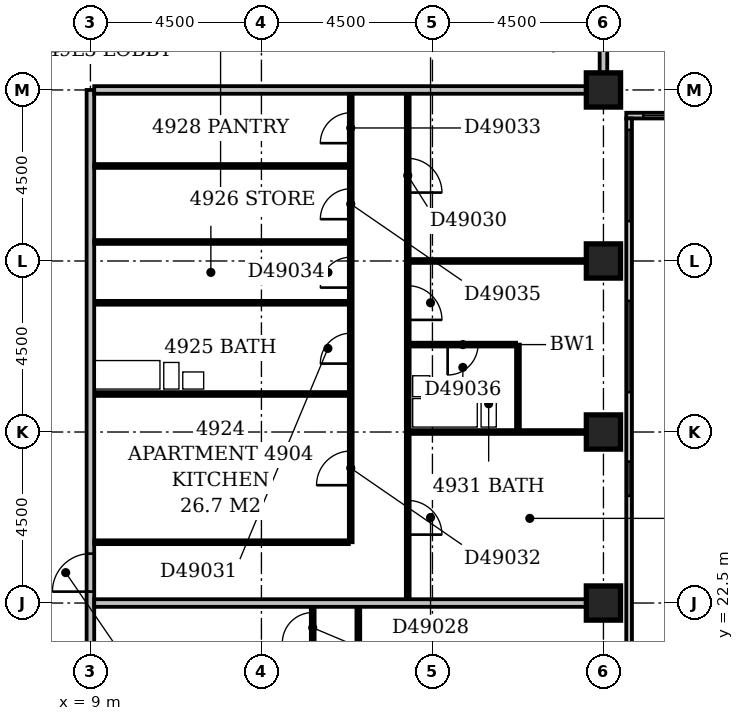
"""IFC4 building model, lengths in metres.
Left out: names, types, materials, properties, quantities, classifications, styles, units other than length and angle.
Written with IfcOpenShell. Run it as: python <this file> out.ifc"""

import sys

from ifc_helpers import new_model, si_unit, direction, frame, frame_2d, origin, origin_2d, place, context, subcontext, project, spatial, rectangle, extrude, element, fill, save


model = new_model("IFC4")
c1 = context("Model", 3, precision=1e-05, world=origin(), true_north=direction((0.0, 1.0)))
c2 = subcontext(c1, "Body", "Model", "MODEL_VIEW")
j1 = project(units=[si_unit("LENGTHUNIT", "METRE"), si_unit("PLANEANGLEUNIT", "RADIAN")], contexts=[c1])
p1 = place(None, origin())
s1 = spatial("IfcSite", under=j1, at=p1, CompositionType="ELEMENT")
p2 = place(p1, origin())
s2 = spatial("IfcBuilding", under=s1, at=p2, CompositionType="ELEMENT")
p3 = place(p2, frame((0.0, 0.0, 193.4)))
s3 = spatial("IfcBuildingStorey", under=s2, at=p3, CompositionType="ELEMENT", Elevation=193.4)
for number, where, z_axis, x_axis in (
    (1, (22.5, 22.5, -0.3), (0.0, 0.0, 1.0), (1.0, 0.0, 0.0)),
    (2, (22.5, 27.0, -0.3), (0.0, 0.0, 1.0), (1.0, 0.0, 0.0)),
    (3, (22.5, 31.5, -0.3), (0.0, 0.0, 1.0), (1.0, 0.0, 0.0)),
    (4, (22.5, 36.0, -0.3), (0.0, 0.0, 1.0), (1.0, 0.0, 0.0)),
):
    element("IfcColumn", number, at=place(p3, frame(where, z_axis=z_axis, x_axis=x_axis)), inside=s3, PredefinedType="COLUMN", context=c2, shape_type="SweptSolid", body=[
        extrude(rectangle(XDim=0.9, YDim=0.9, at=origin_2d()), origin(), (0.0, 0.0, 1.0), 3.6),
    ])
p4 = place(p3, frame((23.175, 17.4, 0.0), z_axis=(0.0, 0.0, 1.0), x_axis=(0.0, 1.0, 0.0)))
e5 = element("IfcWall", 5, at=p4, inside=s3, PredefinedType="STANDARD", context=c2, shape_type="SweptSolid", body=[
    extrude(rectangle(XDim=17.85, YDim=0.15, at=frame_2d((8.925, 0.0))), origin(), (0.0, 0.0, 1.0), 2.7),
])
p5 = place(p4, frame((1.65, 0.0, 0.6)))
e6 = element("IfcOpeningElement", 6, at=p5, cuts=e5, PredefinedType="OPENING", context=c2, shape_type="SweptSolid", body=[
    extrude(rectangle(XDim=2.4, YDim=1.8, at=frame_2d((1.2, 0.9))), frame((0.0, 0.087, 0.0), z_axis=(0.0, -1.0, 0.0), x_axis=(1.0, 0.0, 0.0)), (0.0, 0.0, 1.0), 0.174),
])
p6 = place(p4, frame((7.922, 0.0, 0.6)))
e7 = element("IfcOpeningElement", 7, at=p6, cuts=e5, PredefinedType="OPENING", context=c2, shape_type="SweptSolid", body=[
    extrude(rectangle(XDim=0.9, YDim=1.8, at=frame_2d((0.45, 0.9))), frame((0.0, 0.087, 0.0), z_axis=(0.0, -1.0, 0.0), x_axis=(1.0, 0.0, 0.0)), (0.0, 0.0, 1.0), 0.174),
])
p7 = place(p4, frame((10.65, 0.0, 0.6)))
e8 = element("IfcOpeningElement", 8, at=p7, cuts=e5, PredefinedType="OPENING", context=c2, shape_type="SweptSolid", body=[
    extrude(rectangle(XDim=2.4, YDim=1.8, at=frame_2d((1.2, 0.9))), frame((0.0, 0.087, 0.0), z_axis=(0.0, -1.0, 0.0), x_axis=(1.0, 0.0, 0.0)), (0.0, 0.0, 1.0), 0.174),
])
p8 = place(p4, frame((15.15, 0.0, 0.6)))
e9 = element("IfcOpeningElement", 9, at=p8, cuts=e5, PredefinedType="OPENING", context=c2, shape_type="SweptSolid", body=[
    extrude(rectangle(XDim=2.4, YDim=1.8, at=frame_2d((1.2, 0.9))), frame((0.0, 0.087, 0.0), z_axis=(0.0, -1.0, 0.0), x_axis=(1.0, 0.0, 0.0)), (0.0, 0.0, 1.0), 0.174),
])
p9 = place(p3, frame((23.1, 35.325, 0.0), z_axis=(0.0, 0.0, 1.0), x_axis=(1.0, 0.0, 0.0)))
e10 = element("IfcWall", 10, at=p9, inside=s3, PredefinedType="STANDARD", context=c2, shape_type="SweptSolid", body=[
    extrude(rectangle(XDim=27.15, YDim=0.15, at=frame_2d((13.575, 0.0))), origin(), (0.0, 0.0, 1.0), 2.7),
])
p10 = place(p9, frame((0.45, 0.0, 0.6)))
e11 = element("IfcOpeningElement", 11, at=p10, cuts=e10, PredefinedType="OPENING", context=c2, shape_type="SweptSolid", body=[
    extrude(rectangle(XDim=2.4, YDim=1.8, at=frame_2d((1.2, 0.9))), frame((0.0, 0.087, 0.0), z_axis=(0.0, -1.0, 0.0), x_axis=(1.0, 0.0, 0.0)), (0.0, 0.0, 1.0), 0.174),
])
p11 = place(p9, frame((5.831, 0.0, 0.6)))
e12 = element("IfcOpeningElement", 12, at=p11, cuts=e10, PredefinedType="OPENING", context=c2, shape_type="SweptSolid", body=[
    extrude(rectangle(XDim=1.8, YDim=1.8, at=frame_2d((0.9, 0.9))), frame((0.0, 0.087, 0.0), z_axis=(0.0, -1.0, 0.0), x_axis=(1.0, 0.0, 0.0)), (0.0, 0.0, 1.0), 0.174),
])
p12 = place(p9, frame((9.45, 0.0, 0.6)))
e13 = element("IfcOpeningElement", 13, at=p12, cuts=e10, PredefinedType="OPENING", context=c2, shape_type="SweptSolid", body=[
    extrude(rectangle(XDim=2.4, YDim=1.8, at=frame_2d((1.2, 0.9))), frame((0.0, 0.087, 0.0), z_axis=(0.0, -1.0, 0.0), x_axis=(1.0, 0.0, 0.0)), (0.0, 0.0, 1.0), 0.174),
])
p13 = place(p9, frame((13.95, 0.0, 0.6)))
e14 = element("IfcOpeningElement", 14, at=p13, cuts=e10, PredefinedType="OPENING", context=c2, shape_type="SweptSolid", body=[
    extrude(rectangle(XDim=2.4, YDim=1.8, at=frame_2d((1.2, 0.9))), frame((0.0, 0.087, 0.0), z_axis=(0.0, -1.0, 0.0), x_axis=(1.0, 0.0, 0.0)), (0.0, 0.0, 1.0), 0.174),
])
p14 = place(p9, frame((18.153, 0.0, 0.6)))
e15 = element("IfcOpeningElement", 15, at=p14, cuts=e10, PredefinedType="OPENING", context=c2, shape_type="SweptSolid", body=[
    extrude(rectangle(XDim=2.4, YDim=1.8, at=frame_2d((1.2, 0.9))), frame((0.0, 0.087, 0.0), z_axis=(0.0, -1.0, 0.0), x_axis=(1.0, 0.0, 0.0)), (0.0, 0.0, 1.0), 0.174),
])
p15 = place(p9, frame((22.95, 0.0, 0.6)))
e16 = element("IfcOpeningElement", 16, at=p15, cuts=e10, PredefinedType="OPENING", context=c2, shape_type="SweptSolid", body=[
    extrude(rectangle(XDim=2.4, YDim=1.8, at=frame_2d((1.2, 0.9))), frame((0.0, 0.087, 0.0), z_axis=(0.0, -1.0, 0.0), x_axis=(1.0, 0.0, 0.0)), (0.0, 0.0, 1.0), 0.174),
])
p16 = place(p3, frame((9.0, 5.0, 0.0), z_axis=(0.0, 0.0, 1.0), x_axis=(0.0, 1.0, 0.0)))
e17 = element("IfcWall", 17, at=p16, inside=s3, PredefinedType="PARTITIONING", context=c2, shape_type="SweptSolid", body=[
    extrude(rectangle(XDim=31.0, YDim=0.2, at=frame_2d((15.5, 0.0))), origin(), (0.0, 0.0, 1.0), 3.3),
])
p17 = place(p16, frame((17.8, 0.0, 0.0)))
e18 = element("IfcOpeningElement", 18, at=p17, cuts=e17, PredefinedType="OPENING", context=c2, shape_type="SweptSolid", body=[
    extrude(rectangle(XDim=1.0, YDim=2.1, at=frame_2d((0.5, 1.05))), frame((0.0, 0.112, 0.0), z_axis=(0.0, -1.0, 0.0), x_axis=(1.0, 0.0, 0.0)), (0.0, 0.0, 1.0), 0.224),
])
p18 = place(p16, frame((14.95, 0.0, 0.0)))
e19 = element("IfcOpeningElement", 19, at=p18, cuts=e17, PredefinedType="OPENING", context=c2, shape_type="SweptSolid", body=[
    extrude(rectangle(XDim=1.0, YDim=2.1, at=frame_2d((0.5, 1.05))), frame((0.0, 0.112, 0.0), z_axis=(0.0, -1.0, 0.0), x_axis=(1.0, 0.0, 0.0)), (0.0, 0.0, 1.0), 0.224),
])
p19 = place(p16, frame((9.3, 0.0, 0.0)))
e20 = element("IfcOpeningElement", 20, at=p19, cuts=e17, PredefinedType="OPENING", context=c2, shape_type="SweptSolid", body=[
    extrude(rectangle(XDim=1.0, YDim=2.1, at=frame_2d((0.5, 1.05))), frame((0.0, 0.112, 0.0), z_axis=(0.0, -1.0, 0.0), x_axis=(1.0, 0.0, 0.0)), (0.0, 0.0, 1.0), 0.224),
])
p20 = place(p16, frame((1.5, 0.0, 0.0)))
e21 = element("IfcOpeningElement", 21, at=p20, cuts=e17, PredefinedType="OPENING", context=c2, shape_type="SweptSolid", body=[
    extrude(rectangle(XDim=0.9, YDim=2.1, at=frame_2d((0.45, 1.05))), frame((0.0, 0.112, 0.0), z_axis=(0.0, -1.0, 0.0), x_axis=(1.0, 0.0, 0.0)), (0.0, 0.0, 1.0), 0.224),
])
p21 = place(p3, frame((16.05, 18.1, 0.0), z_axis=(0.0, 0.0, 1.0), x_axis=(0.0, 1.0, 0.0)))
e22 = element("IfcWall", 22, at=p21, inside=s3, PredefinedType="PARTITIONING", context=c2, shape_type="SweptSolid", body=[
    extrude(rectangle(XDim=4.3, YDim=0.1, at=frame_2d((2.15, 0.0))), origin(), (0.0, 0.0, 1.0), 3.3),
])
p22 = place(p21, frame((1.7, 0.0, 0.0)))
e23 = element("IfcOpeningElement", 23, at=p22, cuts=e22, PredefinedType="OPENING", context=c2, shape_type="SweptSolid", body=[
    extrude(rectangle(XDim=0.9, YDim=2.1, at=frame_2d((0.45, 1.05))), frame((0.0, 0.062, 0.0), z_axis=(0.0, -1.0, 0.0), x_axis=(1.0, 0.0, 0.0)), (0.0, 0.0, 1.0), 0.124),
])
p23 = place(p3, frame((14.85, 21.2, 0.0), z_axis=(0.0, 0.0, 1.0), x_axis=(0.0, 1.0, 0.0)))
e24 = element("IfcWall", 24, at=p23, inside=s3, PredefinedType="PARTITIONING", context=c2, shape_type="SweptSolid", body=[
    extrude(rectangle(XDim=1.2, YDim=0.1, at=frame_2d((0.6, 0.0))), origin(), (0.0, 0.0, 1.0), 3.3),
])
p24 = place(p23, frame((0.25, 0.0, 0.0)))
e25 = element("IfcOpeningElement", 25, at=p24, cuts=e24, PredefinedType="OPENING", context=c2, shape_type="SweptSolid", body=[
    extrude(rectangle(XDim=0.8, YDim=2.1, at=frame_2d((0.4, 1.05))), frame((0.0, 0.062, 0.0), z_axis=(0.0, -1.0, 0.0), x_axis=(1.0, 0.0, 0.0)), (0.0, 0.0, 1.0), 0.124),
])
p25 = place(p3, frame((9.1, 22.5, 0.0), z_axis=(0.0, 0.0, 1.0), x_axis=(1.0, 0.0, 0.0)))
e26 = element("IfcWall", 26, at=p25, inside=s3, PredefinedType="PARTITIONING", context=c2, shape_type="SweptSolid", body=[
    extrude(rectangle(XDim=12.95, YDim=0.2, at=frame_2d((6.475, 0.0))), origin(), (0.0, 0.0, 1.0), 3.3),
])
p26 = place(p3, frame((17.35, 22.6, 0.0), z_axis=(0.0, 0.0, 1.0), x_axis=(0.0, 1.0, 0.0)))
e27 = element("IfcWall", 27, at=p26, inside=s3, PredefinedType="PARTITIONING", context=c2, shape_type="SweptSolid", body=[
    extrude(rectangle(XDim=13.3, YDim=0.1, at=frame_2d((6.65, 0.0))), origin(), (0.0, 0.0, 1.0), 3.3),
])
p27 = place(p26, frame((1.7, 0.0, 0.0)))
e28 = element("IfcOpeningElement", 28, at=p27, cuts=e27, PredefinedType="OPENING", context=c2, shape_type="SweptSolid", body=[
    extrude(rectangle(XDim=0.9, YDim=2.1, at=frame_2d((0.45, 1.05))), frame((0.0, 0.062, 0.0), z_axis=(0.0, -1.0, 0.0), x_axis=(1.0, 0.0, 0.0)), (0.0, 0.0, 1.0), 0.124),
])
p28 = place(p26, frame((7.35, 0.0, 0.0)))
e29 = element("IfcOpeningElement", 29, at=p28, cuts=e27, PredefinedType="OPENING", context=c2, shape_type="SweptSolid", body=[
    extrude(rectangle(XDim=0.9, YDim=2.1, at=frame_2d((0.45, 1.05))), frame((0.0, 0.062, 0.0), z_axis=(0.0, -1.0, 0.0), x_axis=(1.0, 0.0, 0.0)), (0.0, 0.0, 1.0), 0.124),
])
p29 = place(p26, frame((10.7, 0.0, 0.0)))
e30 = element("IfcOpeningElement", 30, at=p29, cuts=e27, PredefinedType="OPENING", context=c2, shape_type="SweptSolid", body=[
    extrude(rectangle(XDim=0.9, YDim=2.1, at=frame_2d((0.45, 1.05))), frame((0.0, 0.062, 0.0), z_axis=(0.0, -1.0, 0.0), x_axis=(1.0, 0.0, 0.0)), (0.0, 0.0, 1.0), 0.124),
])
p30 = place(p3, frame((9.1, 24.1, 0.0), z_axis=(0.0, 0.0, 1.0), x_axis=(1.0, 0.0, 0.0)))
e31 = element("IfcWall", 31, at=p30, inside=s3, PredefinedType="PARTITIONING", context=c2, shape_type="SweptSolid", body=[
    extrude(rectangle(XDim=6.7, YDim=0.1, at=frame_2d((3.35, 0.0))), origin(), (0.0, 0.0, 1.0), 3.3),
])
p31 = place(p3, frame((15.85, 24.1, 0.0), z_axis=(0.0, 0.0, 1.0), x_axis=(0.0, 1.0, 0.0)))
e32 = element("IfcWall", 32, at=p31, inside=s3, PredefinedType="PARTITIONING", context=c2, shape_type="SweptSolid", body=[
    extrude(rectangle(XDim=11.8, YDim=0.1, at=frame_2d((5.9, 0.0))), origin(), (0.0, 0.0, 1.0), 3.3),
])
p32 = place(p31, frame((4.7, 0.0, 0.0)))
e33 = element("IfcOpeningElement", 33, at=p32, cuts=e32, PredefinedType="OPENING", context=c2, shape_type="SweptSolid", body=[
    extrude(rectangle(XDim=0.8, YDim=2.1, at=frame_2d((0.4, 1.05))), frame((0.0, 0.062, 0.0), z_axis=(0.0, -1.0, 0.0), x_axis=(1.0, 0.0, 0.0)), (0.0, 0.0, 1.0), 0.124),
])
p33 = place(p31, frame((1.5, 0.0, 0.0)))
e34 = element("IfcOpeningElement", 34, at=p33, cuts=e32, PredefinedType="OPENING", context=c2, shape_type="SweptSolid", body=[
    extrude(rectangle(XDim=0.9, YDim=2.1, at=frame_2d((0.45, 1.05))), frame((0.0, 0.062, 0.0), z_axis=(0.0, -1.0, 0.0), x_axis=(1.0, 0.0, 0.0)), (0.0, 0.0, 1.0), 0.124),
])
p34 = place(p31, frame((10.5, 0.0, 0.0)))
e35 = element("IfcOpeningElement", 35, at=p34, cuts=e32, PredefinedType="OPENING", context=c2, shape_type="SweptSolid", body=[
    extrude(rectangle(XDim=0.8, YDim=2.1, at=frame_2d((0.4, 1.05))), frame((0.0, 0.062, 0.0), z_axis=(0.0, -1.0, 0.0), x_axis=(1.0, 0.0, 0.0)), (0.0, 0.0, 1.0), 0.124),
])
p35 = place(p31, frame((6.7, 0.0, 0.0)))
e36 = element("IfcOpeningElement", 36, at=p35, cuts=e32, PredefinedType="OPENING", context=c2, shape_type="SweptSolid", body=[
    extrude(rectangle(XDim=0.8, YDim=2.1, at=frame_2d((0.4, 1.05))), frame((0.0, 0.062, 0.0), z_axis=(0.0, -1.0, 0.0), x_axis=(1.0, 0.0, 0.0)), (0.0, 0.0, 1.0), 0.124),
])
p36 = place(p31, frame((8.5, 0.0, 0.0)))
e37 = element("IfcOpeningElement", 37, at=p36, cuts=e32, PredefinedType="OPENING", context=c2, shape_type="SweptSolid", body=[
    extrude(rectangle(XDim=0.8, YDim=2.1, at=frame_2d((0.4, 1.05))), frame((0.0, 0.062, 0.0), z_axis=(0.0, -1.0, 0.0), x_axis=(1.0, 0.0, 0.0)), (0.0, 0.0, 1.0), 0.124),
])
p37 = place(p3, frame((17.4, 27.0, 0.0), z_axis=(0.0, 0.0, 1.0), x_axis=(1.0, 0.0, 0.0)))
e38 = element("IfcWall", 38, at=p37, inside=s3, PredefinedType="PARTITIONING", context=c2, shape_type="SweptSolid", body=[
    extrude(rectangle(XDim=4.65, YDim=0.1, at=frame_2d((2.325, 0.0))), origin(), (0.0, 0.0, 1.0), 2.7),
])
p38 = place(p3, frame((20.25, 27.05, 0.0), z_axis=(0.0, 0.0, 1.0), x_axis=(0.0, 1.0, 0.0)))
e39 = element("IfcWall", 39, at=p38, inside=s3, PredefinedType="PLUMBINGWALL", context=c2, shape_type="SweptSolid", body=[
    extrude(rectangle(XDim=2.25, YDim=0.1, at=frame_2d((1.125, 0.0))), origin(), (0.0, 0.0, 1.0), 3.3),
])
p39 = place(p3, frame((9.1, 28.0, 0.0), z_axis=(0.0, 0.0, 1.0), x_axis=(1.0, 0.0, 0.0)))
e40 = element("IfcWall", 40, at=p39, inside=s3, PredefinedType="PLUMBINGWALL", context=c2, shape_type="SweptSolid", body=[
    extrude(rectangle(XDim=6.7, YDim=0.1, at=frame_2d((3.35, 0.0))), origin(), (0.0, 0.0, 1.0), 3.3),
])
p40 = place(p3, frame((17.4, 29.3, 0.0), z_axis=(0.0, 0.0, 1.0), x_axis=(1.0, 0.0, 0.0)))
e41 = element("IfcWall", 41, at=p40, inside=s3, PredefinedType="PLUMBINGWALL", context=c2, shape_type="SweptSolid", body=[
    extrude(rectangle(XDim=2.8, YDim=0.1, at=frame_2d((1.4, 0.0))), origin(), (0.0, 0.0, 1.0), 3.3),
])
p41 = place(p40, frame((1.0, 0.0, 0.0)))
e42 = element("IfcOpeningElement", 42, at=p41, cuts=e41, PredefinedType="OPENING", context=c2, shape_type="SweptSolid", body=[
    extrude(rectangle(XDim=0.8, YDim=2.1, at=frame_2d((0.4, 1.05))), frame((0.0, 0.062, 0.0), z_axis=(0.0, -1.0, 0.0), x_axis=(1.0, 0.0, 0.0)), (0.0, 0.0, 1.0), 0.124),
])
p42 = place(p3, frame((9.1, 30.4, 0.0), z_axis=(0.0, 0.0, 1.0), x_axis=(1.0, 0.0, 0.0)))
e43 = element("IfcWall", 43, at=p42, inside=s3, PredefinedType="PLUMBINGWALL", context=c2, shape_type="SweptSolid", body=[
    extrude(rectangle(XDim=6.7, YDim=0.1, at=frame_2d((3.35, 0.0))), origin(), (0.0, 0.0, 1.0), 3.3),
])
p43 = place(p3, frame((17.4, 31.5, 0.0), z_axis=(0.0, 0.0, 1.0), x_axis=(1.0, 0.0, 0.0)))
e44 = element("IfcWall", 44, at=p43, inside=s3, PredefinedType="PARTITIONING", context=c2, shape_type="SweptSolid", body=[
    extrude(rectangle(XDim=4.65, YDim=0.1, at=frame_2d((2.325, 0.0))), origin(), (0.0, 0.0, 1.0), 3.3),
])
for number, where, z_axis, x_axis in (
    (45, (9.1, 32.0, 0.0), (0.0, 0.0, 1.0), (1.0, 0.0, 0.0)),
    (46, (9.1, 34.0, 0.0), (0.0, 0.0, 1.0), (1.0, 0.0, 0.0)),
):
    element("IfcWall", number, at=place(p3, frame(where, z_axis=z_axis, x_axis=x_axis)), inside=s3, PredefinedType="PARTITIONING", context=c2, shape_type="SweptSolid", body=[
        extrude(rectangle(XDim=6.7, YDim=0.1, at=frame_2d((3.35, 0.0))), origin(), (0.0, 0.0, 1.0), 3.3),
    ])
p44 = place(p3, frame((9.1, 36.0, 0.0), z_axis=(0.0, 0.0, 1.0), x_axis=(1.0, 0.0, 0.0)))
e47 = element("IfcWall", 47, at=p44, inside=s3, PredefinedType="PARTITIONING", context=c2, shape_type="SweptSolid", body=[
    extrude(rectangle(XDim=12.95, YDim=0.2, at=frame_2d((6.475, 0.0))), origin(), (0.0, 0.0, 1.0), 3.3),
])
p45 = place(p3, frame((22.5, 36.45, 0.0), z_axis=(0.0, 0.0, 1.0), x_axis=(0.0, 1.0, 0.0)))
e48 = element("IfcWall", 48, at=p45, inside=s3, PredefinedType="PARTITIONING", context=c2, shape_type="SweptSolid", body=[
    extrude(rectangle(XDim=13.05, YDim=0.2, at=frame_2d((6.525, 0.0))), origin(), (0.0, 0.0, 1.0), 3.3),
])
p46 = place(p6, origin())
e49 = element("IfcWindow", 49, at=p46, inside=s3, PartitioningType="SINGLE_PANEL", PredefinedType="WINDOW", context=c2, shape_type="SweptSolid", body=[
    extrude(rectangle(XDim=0.9, YDim=1.8, at=frame_2d((0.45, 0.9))), frame((0.0, 0.03, 0.0), z_axis=(0.0, -1.0, 0.0), x_axis=(1.0, 0.0, 0.0)), (0.0, 0.0, 1.0), 0.06),
])
fill(e7, e49)
p47 = place(p7, origin())
e50 = element("IfcWindow", 50, at=p47, inside=s3, PartitioningType="SINGLE_PANEL", PredefinedType="WINDOW", context=c2, shape_type="SweptSolid", body=[
    extrude(rectangle(XDim=2.4, YDim=1.8, at=frame_2d((1.2, 0.9))), frame((0.0, 0.03, 0.0), z_axis=(0.0, -1.0, 0.0), x_axis=(1.0, 0.0, 0.0)), (0.0, 0.0, 1.0), 0.06),
])
fill(e8, e50)
p48 = place(p8, origin())
e51 = element("IfcWindow", 51, at=p48, inside=s3, PartitioningType="SINGLE_PANEL", PredefinedType="WINDOW", context=c2, shape_type="SweptSolid", body=[
    extrude(rectangle(XDim=2.4, YDim=1.8, at=frame_2d((1.2, 0.9))), frame((0.0, 0.03, 0.0), z_axis=(0.0, -1.0, 0.0), x_axis=(1.0, 0.0, 0.0)), (0.0, 0.0, 1.0), 0.06),
])
fill(e9, e51)
p49 = place(p10, origin())
e52 = element("IfcWindow", 52, at=p49, inside=s3, PartitioningType="SINGLE_PANEL", PredefinedType="WINDOW", context=c2, shape_type="SweptSolid", body=[
    extrude(rectangle(XDim=2.4, YDim=1.8, at=frame_2d((1.2, 0.9))), frame((0.0, 0.03, 0.0), z_axis=(0.0, -1.0, 0.0), x_axis=(1.0, 0.0, 0.0)), (0.0, 0.0, 1.0), 0.06),
])
fill(e11, e52)
p50 = place(p17, origin())
e53 = element("IfcDoor", 53, at=p50, inside=s3, OperationType="SINGLE_SWING_LEFT", PredefinedType="DOOR", context=c2, shape_type="SweptSolid", body=[
    extrude(rectangle(XDim=1.0, YDim=2.1, at=frame_2d((0.5, 1.05))), frame((0.0, 0.025, 0.0), z_axis=(0.0, -1.0, 0.0), x_axis=(1.0, 0.0, 0.0)), (0.0, 0.0, 1.0), 0.05),
])
fill(e18, e53)
p51 = place(p24, origin())
e54 = element("IfcDoor", 54, at=p51, inside=s3, OperationType="SINGLE_SWING_LEFT", PredefinedType="DOOR", context=c2, shape_type="SweptSolid", body=[
    extrude(rectangle(XDim=0.8, YDim=2.1, at=frame_2d((0.4, 1.05))), frame((0.0, 0.025, 0.0), z_axis=(0.0, -1.0, 0.0), x_axis=(1.0, 0.0, 0.0)), (0.0, 0.0, 1.0), 0.05),
])
fill(e25, e54)
p52 = place(p27, frame((0.9, 0.0, 0.0), z_axis=(0.0, 0.0, 1.0), x_axis=(-1.0, 0.0, 0.0)))
e55 = element("IfcDoor", 55, at=p52, inside=s3, OperationType="SINGLE_SWING_RIGHT", PredefinedType="DOOR", context=c2, shape_type="SweptSolid", body=[
    extrude(rectangle(XDim=0.9, YDim=2.1, at=frame_2d((0.45, 1.05))), frame((0.0, 0.025, 0.0), z_axis=(0.0, -1.0, 0.0), x_axis=(1.0, 0.0, 0.0)), (0.0, 0.0, 1.0), 0.05),
])
fill(e28, e55)
p53 = place(p28, frame((0.9, 0.0, 0.0), z_axis=(0.0, 0.0, 1.0), x_axis=(-1.0, 0.0, 0.0)))
e56 = element("IfcDoor", 56, at=p53, inside=s3, OperationType="SINGLE_SWING_RIGHT", PredefinedType="DOOR", context=c2, shape_type="SweptSolid", body=[
    extrude(rectangle(XDim=0.9, YDim=2.1, at=frame_2d((0.45, 1.05))), frame((0.0, 0.025, 0.0), z_axis=(0.0, -1.0, 0.0), x_axis=(1.0, 0.0, 0.0)), (0.0, 0.0, 1.0), 0.05),
])
fill(e29, e56)
p54 = place(p29, frame((0.9, 0.0, 0.0), z_axis=(0.0, 0.0, 1.0), x_axis=(-1.0, 0.0, 0.0)))
e57 = element("IfcDoor", 57, at=p54, inside=s3, OperationType="SINGLE_SWING_RIGHT", PredefinedType="DOOR", context=c2, shape_type="SweptSolid", body=[
    extrude(rectangle(XDim=0.9, YDim=2.1, at=frame_2d((0.45, 1.05))), frame((0.0, 0.025, 0.0), z_axis=(0.0, -1.0, 0.0), x_axis=(1.0, 0.0, 0.0)), (0.0, 0.0, 1.0), 0.05),
])
fill(e30, e57)
p55 = place(p32, origin())
e58 = element("IfcDoor", 58, at=p55, inside=s3, OperationType="SINGLE_SWING_LEFT", PredefinedType="DOOR", context=c2, shape_type="SweptSolid", body=[
    extrude(rectangle(XDim=0.8, YDim=2.1, at=frame_2d((0.4, 1.05))), frame((0.0, 0.025, 0.0), z_axis=(0.0, -1.0, 0.0), x_axis=(1.0, 0.0, 0.0)), (0.0, 0.0, 1.0), 0.05),
])
fill(e33, e58)
p56 = place(p33, origin())
e59 = element("IfcDoor", 59, at=p56, inside=s3, OperationType="SINGLE_SWING_LEFT", PredefinedType="DOOR", context=c2, shape_type="SweptSolid", body=[
    extrude(rectangle(XDim=0.9, YDim=2.1, at=frame_2d((0.45, 1.05))), frame((0.0, 0.025, 0.0), z_axis=(0.0, -1.0, 0.0), x_axis=(1.0, 0.0, 0.0)), (0.0, 0.0, 1.0), 0.05),
])
fill(e34, e59)
p57 = place(p34, origin())
e60 = element("IfcDoor", 60, at=p57, inside=s3, OperationType="SINGLE_SWING_LEFT", PredefinedType="DOOR", context=c2, shape_type="SweptSolid", body=[
    extrude(rectangle(XDim=0.8, YDim=2.1, at=frame_2d((0.4, 1.05))), frame((0.0, 0.025, 0.0), z_axis=(0.0, -1.0, 0.0), x_axis=(1.0, 0.0, 0.0)), (0.0, 0.0, 1.0), 0.05),
])
fill(e35, e60)
p58 = place(p35, origin())
e61 = element("IfcDoor", 61, at=p58, inside=s3, OperationType="SINGLE_SWING_LEFT", PredefinedType="DOOR", context=c2, shape_type="SweptSolid", body=[
    extrude(rectangle(XDim=0.8, YDim=2.1, at=frame_2d((0.4, 1.05))), frame((0.0, 0.025, 0.0), z_axis=(0.0, -1.0, 0.0), x_axis=(1.0, 0.0, 0.0)), (0.0, 0.0, 1.0), 0.05),
])
fill(e36, e61)
p59 = place(p36, origin())
e62 = element("IfcDoor", 62, at=p59, inside=s3, OperationType="SINGLE_SWING_LEFT", PredefinedType="DOOR", context=c2, shape_type="SweptSolid", body=[
    extrude(rectangle(XDim=0.8, YDim=2.1, at=frame_2d((0.4, 1.05))), frame((0.0, 0.025, 0.0), z_axis=(0.0, -1.0, 0.0), x_axis=(1.0, 0.0, 0.0)), (0.0, 0.0, 1.0), 0.05),
])
fill(e37, e62)
p60 = place(p41, frame((0.8, 0.0, 0.0), z_axis=(0.0, 0.0, 1.0), x_axis=(-1.0, 0.0, 0.0)))
e63 = element("IfcDoor", 63, at=p60, inside=s3, OperationType="SINGLE_SWING_RIGHT", PredefinedType="DOOR", context=c2, shape_type="SweptSolid", body=[
    extrude(rectangle(XDim=0.8, YDim=2.1, at=frame_2d((0.4, 1.05))), frame((0.0, 0.025, 0.0), z_axis=(0.0, -1.0, 0.0), x_axis=(1.0, 0.0, 0.0)), (0.0, 0.0, 1.0), 0.05),
])
fill(e42, e63)
save(model, sys.argv[1])
